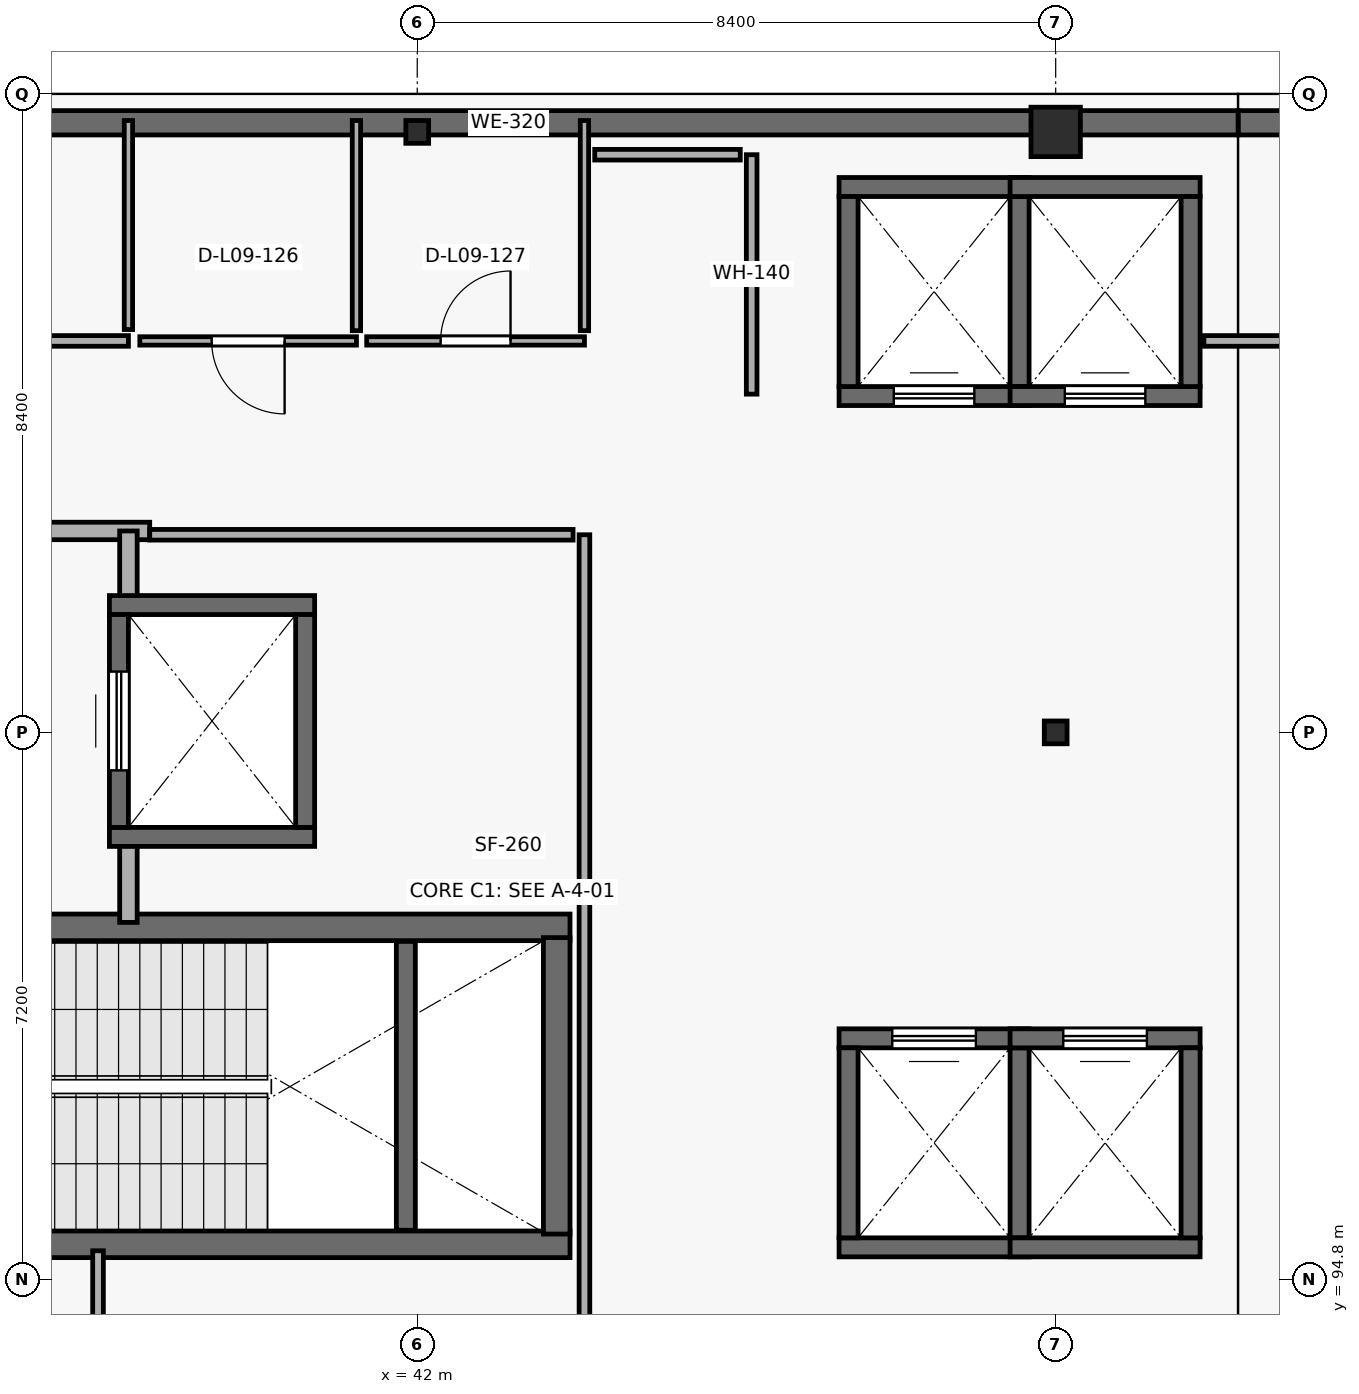
"""IFC4 building model, lengths in metres.
Left out: names, types, materials, properties, quantities, classifications, styles, units other than length and angle.
Written with IfcOpenShell. Run it as: python <this file> out.ifc"""

import sys

from ifc_helpers import new_model, si_unit, direction, frame, frame_2d, origin, origin_2d, place, context, subcontext, project, spatial, rectangle, hollow_rectangle, extrude, element, fill, save


model = new_model("IFC4")
c1 = context("Model", 3, precision=1e-05, world=origin(), true_north=direction((0.0, 1.0)))
c2 = subcontext(c1, "Body", "Model", "MODEL_VIEW")
j1 = project(units=[si_unit("LENGTHUNIT", "METRE"), si_unit("PLANEANGLEUNIT", "RADIAN")], contexts=[c1])
p1 = place(None, origin())
s1 = spatial("IfcSite", under=j1, at=p1, CompositionType="ELEMENT")
p2 = place(p1, origin())
s2 = spatial("IfcBuilding", under=s1, at=p2, CompositionType="ELEMENT")
p3 = place(p2, frame((0.0, 0.0, 40.2)))
s3 = spatial("IfcBuildingStorey", under=s2, at=p3, CompositionType="ELEMENT", Elevation=40.2)
for number, where, z_axis, x_axis in (
    (1, (42.0, 109.9, 0.0), (0.0, 0.0, 1.0), (1.0, 0.0, 0.0)),
    (2, (50.4, 102.0, 0.0), (0.0, 0.0, 1.0), (1.0, 0.0, 0.0)),
):
    element("IfcColumn", number, at=place(p3, frame(where, z_axis=z_axis, x_axis=x_axis)), inside=s3, PredefinedType="COLUMN", context=c2, shape_type="SweptSolid", body=[
        extrude(hollow_rectangle(XDim=0.3, YDim=0.3, WallThickness=0.012, at=origin_2d()), origin(), (0.0, 0.0, 1.0), 4.5),
    ])
p4 = place(p3, frame((50.4, 109.9, 0.0), z_axis=(0.0, 0.0, 1.0), x_axis=(1.0, 0.0, 0.0)))
e3 = element("IfcColumn", 3, at=p4, inside=s3, PredefinedType="COLUMN", context=c2, shape_type="SweptSolid", body=[
    extrude(rectangle(XDim=0.65, YDim=0.65, at=origin_2d()), origin(), (0.0, 0.0, 1.0), 4.5),
])
p5 = place(p3, frame((52.8, 110.02, 0.0), z_axis=(0.0, 0.0, 1.0), x_axis=(1.0, 0.0, 0.0)))
e4 = element("IfcWall", 4, at=p5, inside=s3, PredefinedType="SOLIDWALL", context=c2, shape_type="SweptSolid", body=[
    extrude(rectangle(XDim=14.4, YDim=0.32, at=frame_2d((7.2, 0.0))), origin(), (0.0, 0.0, 1.0), 4.24),
])
p6 = place(p3, frame((33.6, 110.02, 0.0), z_axis=(0.0, 0.0, 1.0), x_axis=(1.0, 0.0, 0.0)))
e5 = element("IfcWall", 5, at=p6, inside=s3, PredefinedType="SOLIDWALL", context=c2, shape_type="SweptSolid", body=[
    extrude(rectangle(XDim=19.2, YDim=0.32, at=frame_2d((9.6, 0.0))), origin(), (0.0, 0.0, 1.0), 4.24),
])
p7 = place(p3, frame((34.79, 95.265, 0.0), z_axis=(0.0, 0.0, 1.0), x_axis=(1.0, 0.0, 0.0)))
e6 = element("IfcWall", 6, at=p7, inside=s3, PredefinedType="SHEAR", context=c2, shape_type="SweptSolid", body=[
    extrude(rectangle(XDim=9.22, YDim=0.35, at=frame_2d((4.61, 0.0))), origin(), (0.0, 0.0, 1.0), 4.24),
])
p8 = place(p7, frame((0.45, 0.0, 0.0)))
e7 = element("IfcOpeningElement", 7, at=p8, cuts=e6, PredefinedType="OPENING", context=c2, shape_type="SweptSolid", body=[
    extrude(rectangle(XDim=1.25, YDim=2.2, at=frame_2d((0.625, 1.1))), frame((0.0, 0.185, 0.0), z_axis=(0.0, -1.0, 0.0), x_axis=(1.0, 0.0, 0.0)), (0.0, 0.0, 1.0), 0.37),
])
p9 = place(p3, frame((44.01, 99.435, 0.0), z_axis=(0.0, 0.0, 1.0), x_axis=(-1.0, 0.0, 0.0)))
e8 = element("IfcWall", 8, at=p9, inside=s3, PredefinedType="SHEAR", context=c2, shape_type="SweptSolid", body=[
    extrude(rectangle(XDim=9.22, YDim=0.35, at=frame_2d((4.61, 0.0))), origin(), (0.0, 0.0, 1.0), 4.24),
])
p10 = place(p9, frame((7.72, 0.0, 0.0)))
e9 = element("IfcOpeningElement", 9, at=p10, cuts=e8, PredefinedType="OPENING", context=c2, shape_type="SweptSolid", body=[
    extrude(rectangle(XDim=1.2, YDim=2.2, at=frame_2d((0.6, 1.1))), frame((0.0, 0.185, 0.0), z_axis=(0.0, -1.0, 0.0), x_axis=(1.0, 0.0, 0.0)), (0.0, 0.0, 1.0), 0.37),
])
p11 = place(p3, frame((43.835, 99.3, 0.0), z_axis=(0.0, 0.0, 1.0), x_axis=(0.0, -1.0, 0.0)))
e10 = element("IfcWall", 10, at=p11, inside=s3, PredefinedType="SHEAR", context=c2, shape_type="SweptSolid", body=[
    extrude(rectangle(XDim=3.9, YDim=0.35, at=frame_2d((1.95, 0.0))), origin(), (0.0, 0.0, 1.0), 4.24),
])
p12 = place(p3, frame((41.85, 95.45, 0.0), z_axis=(0.0, 0.0, 1.0), x_axis=(0.0, 1.0, 0.0)))
e11 = element("IfcWall", 11, at=p12, inside=s3, PredefinedType="SHEAR", context=c2, shape_type="SweptSolid", body=[
    extrude(rectangle(XDim=3.8, YDim=0.25, at=frame_2d((1.9, 0.0))), origin(), (0.0, 0.0, 1.0), 2.07),
])
p13 = place(p3, frame((34.59, 104.65, 0.0), z_axis=(0.0, 0.0, 1.0), x_axis=(1.0, 0.0, 0.0)))
e12 = element("IfcWall", 12, at=p13, inside=s3, PredefinedType="PARTITIONING", context=c2, shape_type="SweptSolid", body=[
    extrude(rectangle(XDim=3.89, YDim=0.23, at=frame_2d((1.945, 0.0))), origin(), (0.0, 0.0, 1.0), 4.24),
])
p14 = place(p13, frame((1.15, 0.0, 0.0)))
e13 = element("IfcOpeningElement", 13, at=p14, cuts=e12, PredefinedType="OPENING", context=c2, shape_type="SweptSolid", body=[
    extrude(rectangle(XDim=1.2, YDim=2.2, at=frame_2d((0.6, 1.1))), frame((0.0, 0.125, 0.0), z_axis=(0.0, -1.0, 0.0), x_axis=(1.0, 0.0, 0.0)), (0.0, 0.0, 1.0), 0.25),
])
p15 = place(p3, frame((38.2, 104.65, 0.0), z_axis=(0.0, 0.0, 1.0), x_axis=(0.0, -1.0, 0.0)))
e14 = element("IfcWall", 14, at=p15, inside=s3, PredefinedType="PARTITIONING", context=c2, shape_type="SweptSolid", body=[
    extrude(rectangle(XDim=1.1, YDim=0.23, at=frame_2d((0.55, 0.0))), origin(), (0.0, 0.0, 1.0), 4.24),
])
p16 = place(p3, frame((38.2, 100.75, 0.0), z_axis=(0.0, 0.0, 1.0), x_axis=(0.0, -1.0, 0.0)))
e15 = element("IfcWall", 15, at=p16, inside=s3, PredefinedType="PARTITIONING", context=c2, shape_type="SweptSolid", body=[
    extrude(rectangle(XDim=1.25, YDim=0.23, at=frame_2d((0.625, 0.0))), origin(), (0.0, 0.0, 1.0), 4.24),
])
p17 = place(p3, frame((47.55, 95.225, 0.0), z_axis=(0.0, 0.0, 1.0), x_axis=(1.0, 0.0, 0.0)))
e16 = element("IfcWall", 16, at=p17, inside=s3, PredefinedType="SHEAR", context=c2, shape_type="SweptSolid", body=[
    extrude(rectangle(XDim=2.5, YDim=0.25, at=frame_2d((1.25, 0.0))), origin(), (0.0, 0.0, 1.0), 4.24),
])
p18 = place(p3, frame((50.05, 97.975, 0.0), z_axis=(0.0, 0.0, 1.0), x_axis=(-1.0, 0.0, 0.0)))
e17 = element("IfcWall", 17, at=p18, inside=s3, PredefinedType="SHEAR", context=c2, shape_type="SweptSolid", body=[
    extrude(rectangle(XDim=2.5, YDim=0.25, at=frame_2d((1.25, 0.0))), origin(), (0.0, 0.0, 1.0), 4.24),
])
p19 = place(p18, frame((0.7, 0.0, 0.0)))
e18 = element("IfcOpeningElement", 18, at=p19, cuts=e17, PredefinedType="OPENING", context=c2, shape_type="SweptSolid", body=[
    extrude(rectangle(XDim=1.1, YDim=2.2, at=frame_2d((0.55, 1.1))), frame((0.0, 0.135, 0.0), z_axis=(0.0, -1.0, 0.0), x_axis=(1.0, 0.0, 0.0)), (0.0, 0.0, 1.0), 0.27),
])
for number, where, z_axis, x_axis in (
    (19, (47.675, 95.35, 0.0), (0.0, 0.0, 1.0), (0.0, 1.0, 0.0)),
    (20, (49.925, 97.85, 0.0), (0.0, 0.0, 1.0), (0.0, -1.0, 0.0)),
    (21, (49.8, 95.225, 0.0), (0.0, 0.0, 1.0), (1.0, 0.0, 0.0)),
):
    element("IfcWall", number, at=place(p3, frame(where, z_axis=z_axis, x_axis=x_axis)), inside=s3, PredefinedType="SHEAR", context=c2, shape_type="SweptSolid", body=[
        extrude(rectangle(XDim=2.5, YDim=0.25, at=frame_2d((1.25, 0.0))), origin(), (0.0, 0.0, 1.0), 4.24),
    ])
p20 = place(p3, frame((52.3, 97.975, 0.0), z_axis=(0.0, 0.0, 1.0), x_axis=(-1.0, 0.0, 0.0)))
e22 = element("IfcWall", 22, at=p20, inside=s3, PredefinedType="SHEAR", context=c2, shape_type="SweptSolid", body=[
    extrude(rectangle(XDim=2.5, YDim=0.25, at=frame_2d((1.25, 0.0))), origin(), (0.0, 0.0, 1.0), 4.24),
])
p21 = place(p20, frame((0.7, 0.0, 0.0)))
e23 = element("IfcOpeningElement", 23, at=p21, cuts=e22, PredefinedType="OPENING", context=c2, shape_type="SweptSolid", body=[
    extrude(rectangle(XDim=1.1, YDim=2.2, at=frame_2d((0.55, 1.1))), frame((0.0, 0.135, 0.0), z_axis=(0.0, -1.0, 0.0), x_axis=(1.0, 0.0, 0.0)), (0.0, 0.0, 1.0), 0.27),
])
p22 = place(p3, frame((52.175, 97.85, 0.0), z_axis=(0.0, 0.0, 1.0), x_axis=(0.0, -1.0, 0.0)))
e24 = element("IfcWall", 24, at=p22, inside=s3, PredefinedType="SHEAR", context=c2, shape_type="SweptSolid", body=[
    extrude(rectangle(XDim=2.5, YDim=0.25, at=frame_2d((1.25, 0.0))), origin(), (0.0, 0.0, 1.0), 4.24),
])
p23 = place(p3, frame((47.55, 106.425, 0.0), z_axis=(0.0, 0.0, 1.0), x_axis=(1.0, 0.0, 0.0)))
e25 = element("IfcWall", 25, at=p23, inside=s3, PredefinedType="SHEAR", context=c2, shape_type="SweptSolid", body=[
    extrude(rectangle(XDim=2.5, YDim=0.25, at=frame_2d((1.25, 0.0))), origin(), (0.0, 0.0, 1.0), 4.24),
])
p24 = place(p23, frame((0.72, 0.0, 0.0)))
e26 = element("IfcOpeningElement", 26, at=p24, cuts=e25, PredefinedType="OPENING", context=c2, shape_type="SweptSolid", body=[
    extrude(rectangle(XDim=1.06, YDim=2.2, at=frame_2d((0.53, 1.1))), frame((0.0, 0.135, 0.0), z_axis=(0.0, -1.0, 0.0), x_axis=(1.0, 0.0, 0.0)), (0.0, 0.0, 1.0), 0.27),
])
for number, where, z_axis, x_axis in (
    (27, (50.05, 109.175, 0.0), (0.0, 0.0, 1.0), (-1.0, 0.0, 0.0)),
    (28, (47.675, 106.55, 0.0), (0.0, 0.0, 1.0), (0.0, 1.0, 0.0)),
    (29, (49.925, 109.05, 0.0), (0.0, 0.0, 1.0), (0.0, -1.0, 0.0)),
):
    element("IfcWall", number, at=place(p3, frame(where, z_axis=z_axis, x_axis=x_axis)), inside=s3, PredefinedType="SHEAR", context=c2, shape_type="SweptSolid", body=[
        extrude(rectangle(XDim=2.5, YDim=0.25, at=frame_2d((1.25, 0.0))), origin(), (0.0, 0.0, 1.0), 4.24),
    ])
p25 = place(p3, frame((49.8, 106.425, 0.0), z_axis=(0.0, 0.0, 1.0), x_axis=(1.0, 0.0, 0.0)))
e30 = element("IfcWall", 30, at=p25, inside=s3, PredefinedType="SHEAR", context=c2, shape_type="SweptSolid", body=[
    extrude(rectangle(XDim=2.5, YDim=0.25, at=frame_2d((1.25, 0.0))), origin(), (0.0, 0.0, 1.0), 4.24),
])
p26 = place(p25, frame((0.72, 0.0, 0.0)))
e31 = element("IfcOpeningElement", 31, at=p26, cuts=e30, PredefinedType="OPENING", context=c2, shape_type="SweptSolid", body=[
    extrude(rectangle(XDim=1.06, YDim=2.2, at=frame_2d((0.53, 1.1))), frame((0.0, 0.135, 0.0), z_axis=(0.0, -1.0, 0.0), x_axis=(1.0, 0.0, 0.0)), (0.0, 0.0, 1.0), 0.27),
])
for number, where, z_axis, x_axis in (
    (32, (52.3, 109.175, 0.0), (0.0, 0.0, 1.0), (-1.0, 0.0, 0.0)),
    (33, (52.175, 109.05, 0.0), (0.0, 0.0, 1.0), (0.0, -1.0, 0.0)),
):
    element("IfcWall", number, at=place(p3, frame(where, z_axis=z_axis, x_axis=x_axis)), inside=s3, PredefinedType="SHEAR", context=c2, shape_type="SweptSolid", body=[
        extrude(rectangle(XDim=2.5, YDim=0.25, at=frame_2d((1.25, 0.0))), origin(), (0.0, 0.0, 1.0), 4.24),
    ])
for number, where, z_axis, x_axis in (
    (34, (37.95, 100.625, 0.0), (0.0, 0.0, 1.0), (1.0, 0.0, 0.0)),
    (35, (40.65, 103.675, 0.0), (0.0, 0.0, 1.0), (-1.0, 0.0, 0.0)),
):
    element("IfcWall", number, at=place(p3, frame(where, z_axis=z_axis, x_axis=x_axis)), inside=s3, PredefinedType="SHEAR", context=c2, shape_type="SweptSolid", body=[
        extrude(rectangle(XDim=2.7, YDim=0.25, at=frame_2d((1.35, 0.0))), origin(), (0.0, 0.0, 1.0), 4.24),
    ])
p27 = place(p3, frame((38.075, 100.75, 0.0), z_axis=(0.0, 0.0, 1.0), x_axis=(0.0, 1.0, 0.0)))
e36 = element("IfcWall", 36, at=p27, inside=s3, PredefinedType="SHEAR", context=c2, shape_type="SweptSolid", body=[
    extrude(rectangle(XDim=2.8, YDim=0.25, at=frame_2d((1.4, 0.0))), origin(), (0.0, 0.0, 1.0), 4.24),
])
p28 = place(p27, frame((0.75, 0.0, 0.0)))
e37 = element("IfcOpeningElement", 37, at=p28, cuts=e36, PredefinedType="OPENING", context=c2, shape_type="SweptSolid", body=[
    extrude(rectangle(XDim=1.3, YDim=2.25, at=frame_2d((0.65, 1.125))), frame((0.0, 0.135, 0.0), z_axis=(0.0, -1.0, 0.0), x_axis=(1.0, 0.0, 0.0)), (0.0, 0.0, 1.0), 0.27),
])
p29 = place(p3, frame((40.525, 103.55, 0.0), z_axis=(0.0, 0.0, 1.0), x_axis=(0.0, -1.0, 0.0)))
e38 = element("IfcWall", 38, at=p29, inside=s3, PredefinedType="SHEAR", context=c2, shape_type="SweptSolid", body=[
    extrude(rectangle(XDim=2.8, YDim=0.25, at=frame_2d((1.4, 0.0))), origin(), (0.0, 0.0, 1.0), 4.24),
])
p30 = place(p3, frame((64.35, 107.15, 0.0), z_axis=(0.0, 0.0, 1.0), x_axis=(-1.0, 0.0, 0.0)))
e39 = element("IfcWall", 39, at=p30, inside=s3, PredefinedType="PARTITIONING", context=c2, shape_type="SweptSolid", body=[
    extrude(rectangle(XDim=12.0, YDim=0.14, at=frame_2d((6.0, 0.0))), origin(), (0.0, 0.0, 1.0), 4.24),
])
p31 = place(p3, frame((44.2, 104.6, 0.0), z_axis=(0.0, 0.0, 1.0), x_axis=(0.0, -1.0, 0.0)))
e40 = element("IfcWall", 40, at=p31, inside=s3, PredefinedType="PARTITIONING", context=c2, shape_type="SweptSolid", body=[
    extrude(rectangle(XDim=10.75, YDim=0.14, at=frame_2d((5.375, 0.0))), origin(), (0.0, 0.0, 1.0), 4.24),
])
p32 = place(p3, frame((38.48, 104.6, 0.0), z_axis=(0.0, 0.0, 1.0), x_axis=(1.0, 0.0, 0.0)))
e41 = element("IfcWall", 41, at=p32, inside=s3, PredefinedType="PARTITIONING", context=c2, shape_type="SweptSolid", body=[
    extrude(rectangle(XDim=5.57, YDim=0.14, at=frame_2d((2.785, 0.0))), origin(), (0.0, 0.0, 1.0), 4.24),
])
p33 = place(p3, frame((38.2, 107.15, 0.0), z_axis=(0.0, 0.0, 1.0), x_axis=(-1.0, 0.0, 0.0)))
e42 = element("IfcWall", 42, at=p33, inside=s3, PredefinedType="PARTITIONING", context=c2, shape_type="SweptSolid", body=[
    extrude(rectangle(XDim=3.6, YDim=0.14, at=frame_2d((1.8, 0.0))), origin(), (0.0, 0.0, 1.0), 4.24),
])
p34 = place(p3, frame((46.4, 106.45, 0.0), z_axis=(0.0, 0.0, 1.0), x_axis=(0.0, 1.0, 0.0)))
e43 = element("IfcWall", 43, at=p34, inside=s3, PredefinedType="PARTITIONING", context=c2, shape_type="SweptSolid", body=[
    extrude(rectangle(XDim=3.15, YDim=0.14, at=frame_2d((1.575, 0.0))), origin(), (0.0, 0.0, 1.0), 4.24),
])
p35 = place(p3, frame((41.2, 107.15, 0.0), z_axis=(0.0, 0.0, 1.0), x_axis=(-1.0, 0.0, 0.0)))
e44 = element("IfcWall", 44, at=p35, inside=s3, PredefinedType="PARTITIONING", context=c2, shape_type="SweptSolid", body=[
    extrude(rectangle(XDim=2.85, YDim=0.11, at=frame_2d((1.425, 0.0))), origin(), (0.0, 0.0, 1.0), 4.24),
])
p36 = place(p35, frame((0.945, 0.0, 0.0)))
e45 = element("IfcOpeningElement", 45, at=p36, cuts=e44, PredefinedType="OPENING", context=c2, shape_type="SweptSolid", body=[
    extrude(rectangle(XDim=0.96, YDim=2.14, at=frame_2d((0.48, 1.07))), frame((0.0, 0.065, 0.0), z_axis=(0.0, -1.0, 0.0), x_axis=(1.0, 0.0, 0.0)), (0.0, 0.0, 1.0), 0.13),
])
p37 = place(p3, frame((44.2, 107.15, 0.0), z_axis=(0.0, 0.0, 1.0), x_axis=(-1.0, 0.0, 0.0)))
e46 = element("IfcWall", 46, at=p37, inside=s3, PredefinedType="PARTITIONING", context=c2, shape_type="SweptSolid", body=[
    extrude(rectangle(XDim=2.865, YDim=0.11, at=frame_2d((1.433, 0.0))), origin(), (0.0, 0.0, 1.0), 4.24),
])
p38 = place(p37, frame((0.972, 0.0, 0.0)))
e47 = element("IfcOpeningElement", 47, at=p38, cuts=e46, PredefinedType="OPENING", context=c2, shape_type="SweptSolid", body=[
    extrude(rectangle(XDim=0.92, YDim=2.12, at=frame_2d((0.46, 1.06))), frame((0.0, 0.065, 0.0), z_axis=(0.0, -1.0, 0.0), x_axis=(1.0, 0.0, 0.0)), (0.0, 0.0, 1.0), 0.13),
])
p39 = place(p3, frame((41.2, 110.05, 0.0), z_axis=(0.0, 0.0, 1.0), x_axis=(0.0, -1.0, 0.0)))
e48 = element("IfcWall", 48, at=p39, inside=s3, PredefinedType="PARTITIONING", context=c2, shape_type="SweptSolid", body=[
    extrude(rectangle(XDim=2.765, YDim=0.11, at=frame_2d((1.383, 0.0))), origin(), (0.0, 0.0, 1.0), 4.24),
])
p40 = place(p3, frame((38.2, 107.3, 0.0), z_axis=(0.0, 0.0, 1.0), x_axis=(0.0, 1.0, 0.0)))
e49 = element("IfcWall", 49, at=p40, inside=s3, PredefinedType="PARTITIONING", context=c2, shape_type="SweptSolid", body=[
    extrude(rectangle(XDim=2.75, YDim=0.11, at=frame_2d((1.375, 0.0))), origin(), (0.0, 0.0, 1.0), 4.24),
])
p41 = place(p3, frame((44.2, 110.05, 0.0), z_axis=(0.0, 0.0, 1.0), x_axis=(0.0, -1.0, 0.0)))
e50 = element("IfcWall", 50, at=p41, inside=s3, PredefinedType="PARTITIONING", context=c2, shape_type="SweptSolid", body=[
    extrude(rectangle(XDim=2.765, YDim=0.11, at=frame_2d((1.383, 0.0))), origin(), (0.0, 0.0, 1.0), 4.24),
])
p42 = place(p3, frame((46.25, 109.6, 0.0), z_axis=(0.0, 0.0, 1.0), x_axis=(-1.0, 0.0, 0.0)))
e51 = element("IfcWall", 51, at=p42, inside=s3, PredefinedType="PARTITIONING", context=c2, shape_type="SweptSolid", body=[
    extrude(rectangle(XDim=1.915, YDim=0.14, at=frame_2d((0.958, 0.0))), origin(), (0.0, 0.0, 1.0), 3.3),
])
p43 = place(p3, frame((37.8, 94.0, 0.0), z_axis=(0.0, 0.0, 1.0), x_axis=(0.0, 1.0, 0.0)))
e52 = element("IfcWall", 52, at=p43, inside=s3, PredefinedType="PARTITIONING", context=c2, shape_type="SweptSolid", body=[
    extrude(rectangle(XDim=1.18, YDim=0.14, at=frame_2d((0.59, 0.0))), origin(), (0.0, 0.0, 1.0), 4.24),
])
p44 = place(p19, origin())
e53 = element("IfcDoor", 53, at=p44, inside=s3, OperationType="SLIDING_TO_RIGHT", PredefinedType="DOOR", context=c2, shape_type="SweptSolid", body=[
    extrude(rectangle(XDim=1.1, YDim=2.2, at=frame_2d((0.55, 1.1))), frame((0.0, 0.025, 0.0), z_axis=(0.0, -1.0, 0.0), x_axis=(1.0, 0.0, 0.0)), (0.0, 0.0, 1.0), 0.05),
])
fill(e18, e53)
p45 = place(p21, origin())
e54 = element("IfcDoor", 54, at=p45, inside=s3, OperationType="SLIDING_TO_RIGHT", PredefinedType="DOOR", context=c2, shape_type="SweptSolid", body=[
    extrude(rectangle(XDim=1.1, YDim=2.2, at=frame_2d((0.55, 1.1))), frame((0.0, 0.025, 0.0), z_axis=(0.0, -1.0, 0.0), x_axis=(1.0, 0.0, 0.0)), (0.0, 0.0, 1.0), 0.05),
])
fill(e23, e54)
p46 = place(p24, origin())
e55 = element("IfcDoor", 55, at=p46, inside=s3, OperationType="SLIDING_TO_RIGHT", PredefinedType="DOOR", context=c2, shape_type="SweptSolid", body=[
    extrude(rectangle(XDim=1.06, YDim=2.2, at=frame_2d((0.53, 1.1))), frame((0.0, 0.025, 0.0), z_axis=(0.0, -1.0, 0.0), x_axis=(1.0, 0.0, 0.0)), (0.0, 0.0, 1.0), 0.05),
])
fill(e26, e55)
p47 = place(p26, origin())
e56 = element("IfcDoor", 56, at=p47, inside=s3, OperationType="SLIDING_TO_RIGHT", PredefinedType="DOOR", context=c2, shape_type="SweptSolid", body=[
    extrude(rectangle(XDim=1.06, YDim=2.2, at=frame_2d((0.53, 1.1))), frame((0.0, 0.025, 0.0), z_axis=(0.0, -1.0, 0.0), x_axis=(1.0, 0.0, 0.0)), (0.0, 0.0, 1.0), 0.05),
])
fill(e31, e56)
p48 = place(p28, origin())
e57 = element("IfcDoor", 57, at=p48, inside=s3, OperationType="SLIDING_TO_RIGHT", PredefinedType="DOOR", context=c2, shape_type="SweptSolid", body=[
    extrude(rectangle(XDim=1.3, YDim=2.25, at=frame_2d((0.65, 1.125))), frame((0.0, 0.025, 0.0), z_axis=(0.0, -1.0, 0.0), x_axis=(1.0, 0.0, 0.0)), (0.0, 0.0, 1.0), 0.05),
])
fill(e37, e57)
p49 = place(p36, origin())
e58 = element("IfcDoor", 58, at=p49, inside=s3, OperationType="SINGLE_SWING_LEFT", PredefinedType="DOOR", context=c2, shape_type="SweptSolid", body=[
    extrude(rectangle(XDim=0.96, YDim=2.14, at=frame_2d((0.48, 1.07))), frame((0.0, 0.025, 0.0), z_axis=(0.0, -1.0, 0.0), x_axis=(1.0, 0.0, 0.0)), (0.0, 0.0, 1.0), 0.05),
])
fill(e45, e58)
p50 = place(p38, origin())
e59 = element("IfcDoor", 59, at=p50, inside=s3, OperationType="SINGLE_SWING_RIGHT", PredefinedType="DOOR", context=c2, shape_type="SweptSolid", body=[
    extrude(rectangle(XDim=0.92, YDim=2.12, at=frame_2d((0.46, 1.06))), frame((0.0, 0.025, 0.0), z_axis=(0.0, -1.0, 0.0), x_axis=(1.0, 0.0, 0.0)), (0.0, 0.0, 1.0), 0.05),
])
fill(e47, e59)
save(model, sys.argv[1])
